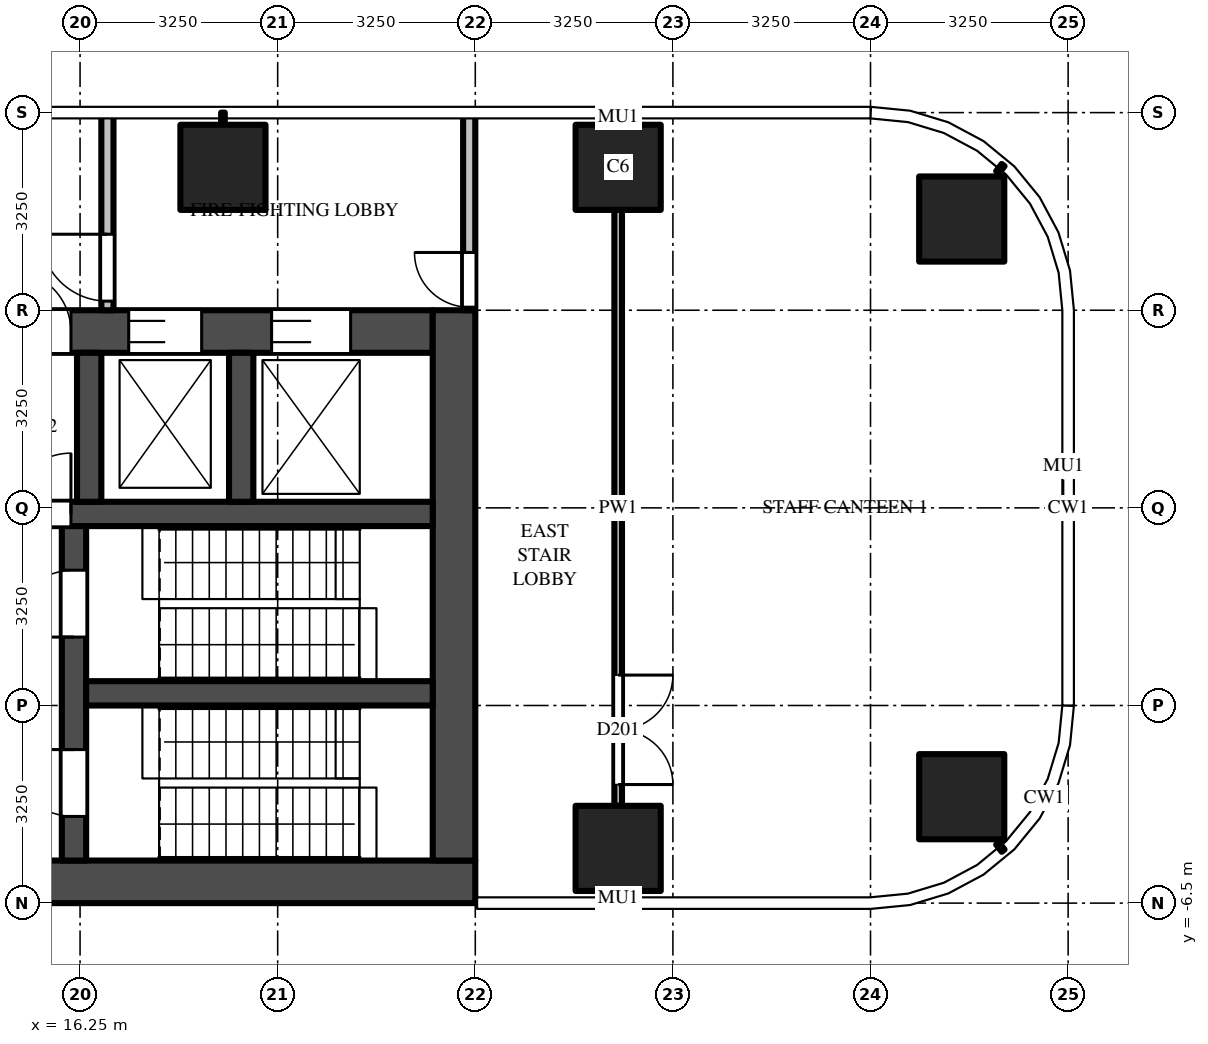
"""IFC4 building model, lengths in metres.
Left out: names, types, materials, properties, quantities, classifications, styles, units other than length and angle.
Written with IfcOpenShell. Run it as: python <this file> out.ifc"""

import sys

from ifc_helpers import new_model, si_unit, direction, frame, frame_2d, origin, origin_2d, place, context, subcontext, project, spatial, rectangle, extrude, source, transform, mapped, element, fill, save


model = new_model("IFC4")
c1 = context("Model", 3, precision=1e-05, world=origin(), true_north=direction((0.0, 1.0)))
c2 = subcontext(c1, "Body", "Model", "MODEL_VIEW")
j1 = project(units=[si_unit("LENGTHUNIT", "METRE"), si_unit("PLANEANGLEUNIT", "RADIAN")], contexts=[c1])
p1 = place(None, origin())
s1 = spatial("IfcSite", under=j1, at=p1, CompositionType="ELEMENT")
p2 = place(p1, origin())
s2 = spatial("IfcBuilding", under=s1, at=p2, CompositionType="ELEMENT")
p3 = place(p2, frame((0.0, 0.0, 74.5)))
s3 = spatial("IfcBuildingStorey", under=s2, at=p3, CompositionType="ELEMENT", Elevation=74.5)
m1 = source(origin(), c2, "Body", "SweptSolid", [
    extrude(rectangle(XDim=1.4, YDim=1.4, at=origin_2d()), origin(), (0.0, 0.0, 1.0), 4.5),
])
for number, where, z_axis, x_axis in (
    (1, (18.6, 5.6, 0.0), (0.0, 0.0, 1.0), (1.0, 0.0, 0.0)),
    (2, (25.1, 5.6, 0.0), (0.0, 0.0, 1.0), (1.0, 0.0, 0.0)),
    (3, (30.75, 4.75, 0.0), (0.0, 0.0, 1.0), (1.0, 0.0, 0.0)),
    (4, (25.1, -5.6, 0.0), (0.0, 0.0, 1.0), (1.0, 0.0, 0.0)),
    (5, (30.75, -4.75, 0.0), (0.0, 0.0, 1.0), (1.0, 0.0, 0.0)),
):
    element("IfcColumn", number, at=place(p3, frame(where, z_axis=z_axis, x_axis=x_axis)), inside=s3, PredefinedType="COLUMN", context=c2, shape_type="MappedRepresentation", body=[
        mapped(m1, transform((0.0, 0.0, 0.0))),
    ])
m2 = source(origin(), c2, "Body", "SweptSolid", [
    extrude(rectangle(XDim=16.45, YDim=0.7, at=frame_2d((8.225, 0.0))), origin(), (0.0, 0.0, 1.0), 4.25),
])
p4 = place(p3, frame((6.3, -6.15, 0.0), z_axis=(0.0, 0.0, 1.0), x_axis=(1.0, 0.0, 0.0)))
e6 = element("IfcWall", 6, at=p4, inside=s3, PredefinedType="SHEAR", context=c2, shape_type="MappedRepresentation", body=[
    mapped(m2, transform((0.0, 0.0, 0.0))),
])
m3 = source(origin(), c2, "Body", "SweptSolid", [
    extrude(rectangle(XDim=14.85, YDim=0.7, at=frame_2d((7.425, 0.0))), origin(), (0.0, 0.0, 1.0), 4.25),
])
p5 = place(p3, frame((7.2, 2.9, 0.0), z_axis=(0.0, 0.0, 1.0), x_axis=(1.0, 0.0, 0.0)))
e7 = element("IfcWall", 7, at=p5, inside=s3, PredefinedType="SHEAR", context=c2, shape_type="MappedRepresentation", body=[
    mapped(m3, transform((0.0, 0.0, 0.0))),
])
m4 = source(origin(), c2, "Body", "SweptSolid", [
    extrude(rectangle(XDim=1.3, YDim=2.1, at=frame_2d((0.65, 1.05))), frame((0.0, 0.36, 0.0), z_axis=(0.0, -1.0, 0.0), x_axis=(1.0, 0.0, 0.0)), (0.0, 0.0, 1.0), 0.72),
])
p6 = place(p5, frame((12.2, 0.0, 0.0)))
e8 = element("IfcOpeningElement", 8, at=p6, cuts=e7, PredefinedType="OPENING", context=c2, shape_type="MappedRepresentation", body=[
    mapped(m4, transform((0.0, 0.0, 0.0))),
])
m5 = source(origin(), c2, "Body", "SweptSolid", [
    extrude(rectangle(XDim=1.2, YDim=2.1, at=frame_2d((0.6, 1.05))), frame((0.0, 0.36, 0.0), z_axis=(0.0, -1.0, 0.0), x_axis=(1.0, 0.0, 0.0)), (0.0, 0.0, 1.0), 0.72),
])
p7 = place(p5, frame((9.85, 0.0, 0.0)))
e9 = element("IfcOpeningElement", 9, at=p7, cuts=e7, PredefinedType="OPENING", context=c2, shape_type="MappedRepresentation", body=[
    mapped(m5, transform((0.0, 0.0, 0.0))),
])
m6 = source(origin(), c2, "Body", "SweptSolid", [
    extrude(rectangle(XDim=1.0, YDim=2.1, at=frame_2d((0.5, 1.05))), frame((0.0, 0.36, 0.0), z_axis=(0.0, -1.0, 0.0), x_axis=(1.0, 0.0, 0.0)), (0.0, 0.0, 1.0), 0.72),
])
p8 = place(p5, frame((7.9, 0.0, 0.0)))
e10 = element("IfcOpeningElement", 10, at=p8, cuts=e7, PredefinedType="OPENING", context=c2, shape_type="MappedRepresentation", body=[
    mapped(m6, transform((0.0, 0.0, 0.0))),
])
m7 = source(origin(), c2, "Body", "SweptSolid", [
    extrude(rectangle(XDim=0.8, YDim=2.1, at=frame_2d((0.4, 1.05))), frame((0.0, 0.36, 0.0), z_axis=(0.0, -1.0, 0.0), x_axis=(1.0, 0.0, 0.0)), (0.0, 0.0, 1.0), 0.72),
])
p9 = place(p5, frame((0.113, 0.0, 0.0)))
e11 = element("IfcOpeningElement", 11, at=p9, cuts=e7, PredefinedType="OPENING", context=c2, shape_type="MappedRepresentation", body=[
    mapped(m7, transform((0.0, 0.0, 0.0))),
])
p10 = place(p5, frame((1.288, 0.0, 0.0)))
e12 = element("IfcOpeningElement", 12, at=p10, cuts=e7, PredefinedType="OPENING", context=c2, shape_type="MappedRepresentation", body=[
    mapped(m7, transform((0.0, 0.0, 0.0))),
])
p11 = place(p5, frame((2.712, 0.0, 0.0)))
e13 = element("IfcOpeningElement", 13, at=p11, cuts=e7, PredefinedType="OPENING", context=c2, shape_type="MappedRepresentation", body=[
    mapped(m7, transform((0.0, 0.0, 0.0))),
])
p12 = place(p5, frame((3.887, 0.0, 0.0)))
e14 = element("IfcOpeningElement", 14, at=p12, cuts=e7, PredefinedType="OPENING", context=c2, shape_type="MappedRepresentation", body=[
    mapped(m7, transform((0.0, 0.0, 0.0))),
])
p13 = place(p5, frame((5.312, 0.0, 0.0)))
e15 = element("IfcOpeningElement", 15, at=p13, cuts=e7, PredefinedType="OPENING", context=c2, shape_type="MappedRepresentation", body=[
    mapped(m7, transform((0.0, 0.0, 0.0))),
])
p14 = place(p5, frame((6.488, 0.0, 0.0)))
e16 = element("IfcOpeningElement", 16, at=p14, cuts=e7, PredefinedType="OPENING", context=c2, shape_type="MappedRepresentation", body=[
    mapped(m7, transform((0.0, 0.0, 0.0))),
])
m8 = source(origin(), c2, "Body", "SweptSolid", [
    extrude(rectangle(XDim=9.05, YDim=0.7, at=frame_2d((4.525, 0.0))), origin(), (0.0, 0.0, 1.0), 4.25),
])
p15 = place(p3, frame((22.4, -5.8, 0.0), z_axis=(0.0, 0.0, 1.0), x_axis=(0.0, 1.0, 0.0)))
e17 = element("IfcWall", 17, at=p15, inside=s3, PredefinedType="SHEAR", context=c2, shape_type="MappedRepresentation", body=[
    mapped(m8, transform((0.0, 0.0, 0.0))),
])
m9 = source(origin(), c2, "Body", "SweptSolid", [
    extrude(rectangle(XDim=14.85, YDim=0.4, at=frame_2d((7.425, 0.0))), origin(), (0.0, 0.0, 1.0), 4.25),
])
p16 = place(p3, frame((7.2, -0.1, 0.0), z_axis=(0.0, 0.0, 1.0), x_axis=(1.0, 0.0, 0.0)))
e18 = element("IfcWall", 18, at=p16, inside=s3, PredefinedType="SHEAR", context=c2, shape_type="MappedRepresentation", body=[
    mapped(m9, transform((0.0, 0.0, 0.0))),
])
m10 = source(origin(), c2, "Body", "SweptSolid", [
    extrude(rectangle(XDim=1.0, YDim=2.1, at=frame_2d((0.5, 1.05))), frame((0.0, 0.21, 0.0), z_axis=(0.0, -1.0, 0.0), x_axis=(1.0, 0.0, 0.0)), (0.0, 0.0, 1.0), 0.42),
])
p17 = place(p16, frame((7.9, 0.0, 0.0)))
e19 = element("IfcOpeningElement", 19, at=p17, cuts=e18, PredefinedType="OPENING", context=c2, shape_type="MappedRepresentation", body=[
    mapped(m10, transform((0.0, 0.0, 0.0))),
])
m11 = source(origin(), c2, "Body", "SweptSolid", [
    extrude(rectangle(XDim=5.5, YDim=0.4, at=frame_2d((2.75, 0.0))), origin(), (0.0, 0.0, 1.0), 4.25),
])
p18 = place(p3, frame((16.15, -5.8, 0.0), z_axis=(0.0, 0.0, 1.0), x_axis=(0.0, 1.0, 0.0)))
e20 = element("IfcWall", 20, at=p18, inside=s3, PredefinedType="SHEAR", context=c2, shape_type="MappedRepresentation", body=[
    mapped(m11, transform((0.0, 0.0, 0.0))),
])
m12 = source(origin(), c2, "Body", "SweptSolid", [
    extrude(rectangle(XDim=1.1, YDim=2.1, at=frame_2d((0.55, 1.05))), frame((0.0, 0.21, 0.0), z_axis=(0.0, -1.0, 0.0), x_axis=(1.0, 0.0, 0.0)), (0.0, 0.0, 1.0), 0.42),
])
p19 = place(p18, frame((0.725, 0.0, 0.0)))
e21 = element("IfcOpeningElement", 21, at=p19, cuts=e20, PredefinedType="OPENING", context=c2, shape_type="MappedRepresentation", body=[
    mapped(m12, transform((0.0, 0.0, 0.0))),
])
p20 = place(p18, frame((3.675, 0.0, 0.0)))
e22 = element("IfcOpeningElement", 22, at=p20, cuts=e20, PredefinedType="OPENING", context=c2, shape_type="MappedRepresentation", body=[
    mapped(m12, transform((0.0, 0.0, 0.0))),
])
m13 = source(origin(), c2, "Body", "SweptSolid", [
    extrude(rectangle(XDim=5.7, YDim=0.4, at=frame_2d((2.85, 0.0))), origin(), (0.0, 0.0, 1.0), 4.25),
])
p21 = place(p3, frame((16.35, -3.05, 0.0), z_axis=(0.0, 0.0, 1.0), x_axis=(1.0, 0.0, 0.0)))
e23 = element("IfcWall", 23, at=p21, inside=s3, PredefinedType="SHEAR", context=c2, shape_type="MappedRepresentation", body=[
    mapped(m13, transform((0.0, 0.0, 0.0))),
])
m14 = source(origin(), c2, "Body", "SweptSolid", [
    extrude(rectangle(XDim=2.45, YDim=0.4, at=frame_2d((1.225, 0.0))), origin(), (0.0, 0.0, 1.0), 4.25),
])
for number, where, z_axis, x_axis in (
    (24, (16.4, 0.1, 0.0), (0.0, 0.0, 1.0), (0.0, 1.0, 0.0)),
    (25, (18.9, 0.1, 0.0), (0.0, 0.0, 1.0), (0.0, 1.0, 0.0)),
):
    element("IfcWall", number, at=place(p3, frame(where, z_axis=z_axis, x_axis=x_axis)), inside=s3, PredefinedType="SHEAR", context=c2, shape_type="MappedRepresentation", body=[
        mapped(m14, transform((0.0, 0.0, 0.0))),
    ])
m15 = source(origin(), c2, "Body", "SweptSolid", [
    extrude(rectangle(XDim=3.25, YDim=0.2, at=frame_2d((1.625, 0.0))), origin(), (0.0, 0.0, 1.0), 4.25),
])
p22 = place(p3, frame((16.7, 3.25, 0.0), z_axis=(0.0, 0.0, 1.0), x_axis=(0.0, 1.0, 0.0)))
e26 = element("IfcWall", 26, at=p22, inside=s3, PredefinedType="PARTITIONING", context=c2, shape_type="MappedRepresentation", body=[
    mapped(m15, transform((0.0, 0.0, 0.0))),
])
m16 = source(origin(), c2, "Body", "SweptSolid", [
    extrude(rectangle(XDim=1.1, YDim=2.1, at=frame_2d((0.55, 1.05))), frame((0.0, 0.11, 0.0), z_axis=(0.0, -1.0, 0.0), x_axis=(1.0, 0.0, 0.0)), (0.0, 0.0, 1.0), 0.22),
])
p23 = place(p22, frame((0.15, 0.0, 0.0)))
e27 = element("IfcOpeningElement", 27, at=p23, cuts=e26, PredefinedType="OPENING", context=c2, shape_type="MappedRepresentation", body=[
    mapped(m16, transform((0.0, 0.0, 0.0))),
])
p24 = place(p3, frame((22.65, 3.25, 0.0), z_axis=(0.0, 0.0, 1.0), x_axis=(0.0, 1.0, 0.0)))
e28 = element("IfcWall", 28, at=p24, inside=s3, PredefinedType="PARTITIONING", context=c2, shape_type="MappedRepresentation", body=[
    mapped(m15, transform((0.0, 0.0, 0.0))),
])
m17 = source(origin(), c2, "Body", "SweptSolid", [
    extrude(rectangle(XDim=0.9, YDim=2.1, at=frame_2d((0.45, 1.05))), frame((0.0, 0.11, 0.0), z_axis=(0.0, -1.0, 0.0), x_axis=(1.0, 0.0, 0.0)), (0.0, 0.0, 1.0), 0.22),
])
p25 = place(p24, frame((0.05, 0.0, 0.0)))
e29 = element("IfcOpeningElement", 29, at=p25, cuts=e28, PredefinedType="OPENING", context=c2, shape_type="MappedRepresentation", body=[
    mapped(m17, transform((0.0, 0.0, 0.0))),
])
m18 = source(origin(), c2, "Body", "SweptSolid", [
    extrude(rectangle(XDim=9.8, YDim=0.125, at=frame_2d((4.9, 0.0))), origin(), (0.0, 0.0, 1.0), 3.468),
])
p26 = place(p3, frame((25.1, 4.9, 0.0), z_axis=(0.0, 0.0, 1.0), x_axis=(0.0, -1.0, 0.0)))
e30 = element("IfcWall", 30, at=p26, inside=s3, PredefinedType="PARTITIONING", context=c2, shape_type="MappedRepresentation", body=[
    mapped(m18, transform((0.0, 0.0, 0.0))),
])
m19 = source(origin(), c2, "Body", "SweptSolid", [
    extrude(rectangle(XDim=1.8, YDim=2.1, at=frame_2d((0.9, 1.05))), frame((0.0, 0.073, 0.0), z_axis=(0.0, -1.0, 0.0), x_axis=(1.0, 0.0, 0.0)), (0.0, 0.0, 1.0), 0.145),
])
p27 = place(p26, frame((7.65, 0.0, 0.0)))
e31 = element("IfcOpeningElement", 31, at=p27, cuts=e30, PredefinedType="OPENING", context=c2, shape_type="MappedRepresentation", body=[
    mapped(m19, transform((0.0, 0.0, 0.0))),
])
m20 = source(origin(), c2, "Body", "SweptSolid", [
    extrude(rectangle(XDim=1.3, YDim=2.1, at=frame_2d((0.65, 1.05))), frame((0.0, -0.275, 0.0), z_axis=(0.0, -1.0, 0.0), x_axis=(1.0, 0.0, 0.0)), (0.0, 0.0, 1.0), 0.05),
])
p28 = place(p6, origin())
e32 = element("IfcDoor", 32, at=p28, inside=s3, OperationType="DOUBLE_DOOR_SLIDING", PredefinedType="DOOR", context=c2, shape_type="MappedRepresentation", body=[
    mapped(m20, transform((0.0, 0.0, 0.0))),
])
fill(e8, e32)
m21 = source(origin(), c2, "Body", "SweptSolid", [
    extrude(rectangle(XDim=1.2, YDim=2.1, at=frame_2d((0.6, 1.05))), frame((0.0, -0.275, 0.0), z_axis=(0.0, -1.0, 0.0), x_axis=(1.0, 0.0, 0.0)), (0.0, 0.0, 1.0), 0.05),
])
p29 = place(p7, origin())
e33 = element("IfcDoor", 33, at=p29, inside=s3, OperationType="DOUBLE_DOOR_SLIDING", PredefinedType="DOOR", context=c2, shape_type="MappedRepresentation", body=[
    mapped(m21, transform((0.0, 0.0, 0.0))),
])
fill(e9, e33)
m22 = source(origin(), c2, "Body", "SweptSolid", [
    extrude(rectangle(XDim=1.1, YDim=2.1, at=frame_2d((0.55, 1.05))), frame((0.0, 0.025, 0.0), z_axis=(0.0, -1.0, 0.0), x_axis=(1.0, 0.0, 0.0)), (0.0, 0.0, 1.0), 0.05),
])
p30 = place(p19, origin())
e34 = element("IfcDoor", 34, at=p30, inside=s3, OperationType="SINGLE_SWING_RIGHT", PredefinedType="DOOR", context=c2, shape_type="MappedRepresentation", body=[
    mapped(m22, transform((0.0, 0.0, 0.0))),
])
fill(e21, e34)
p31 = place(p20, origin())
e35 = element("IfcDoor", 35, at=p31, inside=s3, OperationType="SINGLE_SWING_LEFT", PredefinedType="DOOR", context=c2, shape_type="MappedRepresentation", body=[
    mapped(m22, transform((0.0, 0.0, 0.0))),
])
fill(e22, e35)
m23 = source(origin(), c2, "Body", "SweptSolid", [
    extrude(rectangle(XDim=1.0, YDim=2.1, at=frame_2d((0.5, 1.05))), frame((0.0, 0.025, 0.0), z_axis=(0.0, -1.0, 0.0), x_axis=(1.0, 0.0, 0.0)), (0.0, 0.0, 1.0), 0.05),
])
p32 = place(p17, origin())
e36 = element("IfcDoor", 36, at=p32, inside=s3, OperationType="SINGLE_SWING_RIGHT", PredefinedType="DOOR", context=c2, shape_type="MappedRepresentation", body=[
    mapped(m23, transform((0.0, 0.0, 0.0))),
])
fill(e19, e36)
m24 = source(origin(), c2, "Body", "SweptSolid", [
    extrude(rectangle(XDim=1.0, YDim=2.1, at=frame_2d((0.5, 1.05))), frame((0.0, -0.275, 0.0), z_axis=(0.0, -1.0, 0.0), x_axis=(1.0, 0.0, 0.0)), (0.0, 0.0, 1.0), 0.05),
])
p33 = place(p8, origin())
e37 = element("IfcDoor", 37, at=p33, inside=s3, OperationType="SINGLE_SWING_LEFT", PredefinedType="DOOR", context=c2, shape_type="MappedRepresentation", body=[
    mapped(m24, transform((0.0, 0.0, 0.0))),
])
fill(e10, e37)
p34 = place(p23, origin())
e38 = element("IfcDoor", 38, at=p34, inside=s3, OperationType="SINGLE_SWING_RIGHT", PredefinedType="DOOR", context=c2, shape_type="MappedRepresentation", body=[
    mapped(m22, transform((0.0, 0.0, 0.0))),
])
fill(e27, e38)
m25 = source(origin(), c2, "Body", "SweptSolid", [
    extrude(rectangle(XDim=0.9, YDim=2.1, at=frame_2d((0.45, 1.05))), frame((0.0, 0.025, 0.0), z_axis=(0.0, -1.0, 0.0), x_axis=(1.0, 0.0, 0.0)), (0.0, 0.0, 1.0), 0.05),
])
p35 = place(p25, origin())
e39 = element("IfcDoor", 39, at=p35, inside=s3, OperationType="SINGLE_SWING_RIGHT", PredefinedType="DOOR", context=c2, shape_type="MappedRepresentation", body=[
    mapped(m25, transform((0.0, 0.0, 0.0))),
])
fill(e29, e39)
m26 = source(origin(), c2, "Body", "SweptSolid", [
    extrude(rectangle(XDim=1.8, YDim=2.1, at=frame_2d((0.9, 1.05))), frame((0.0, 0.025, 0.0), z_axis=(0.0, -1.0, 0.0), x_axis=(1.0, 0.0, 0.0)), (0.0, 0.0, 1.0), 0.05),
])
p36 = place(p27, origin())
e40 = element("IfcDoor", 40, at=p36, inside=s3, OperationType="DOUBLE_DOOR_SINGLE_SWING", PredefinedType="DOOR", context=c2, shape_type="MappedRepresentation", body=[
    mapped(m26, transform((0.0, 0.0, 0.0))),
])
fill(e31, e40)
save(model, sys.argv[1])
